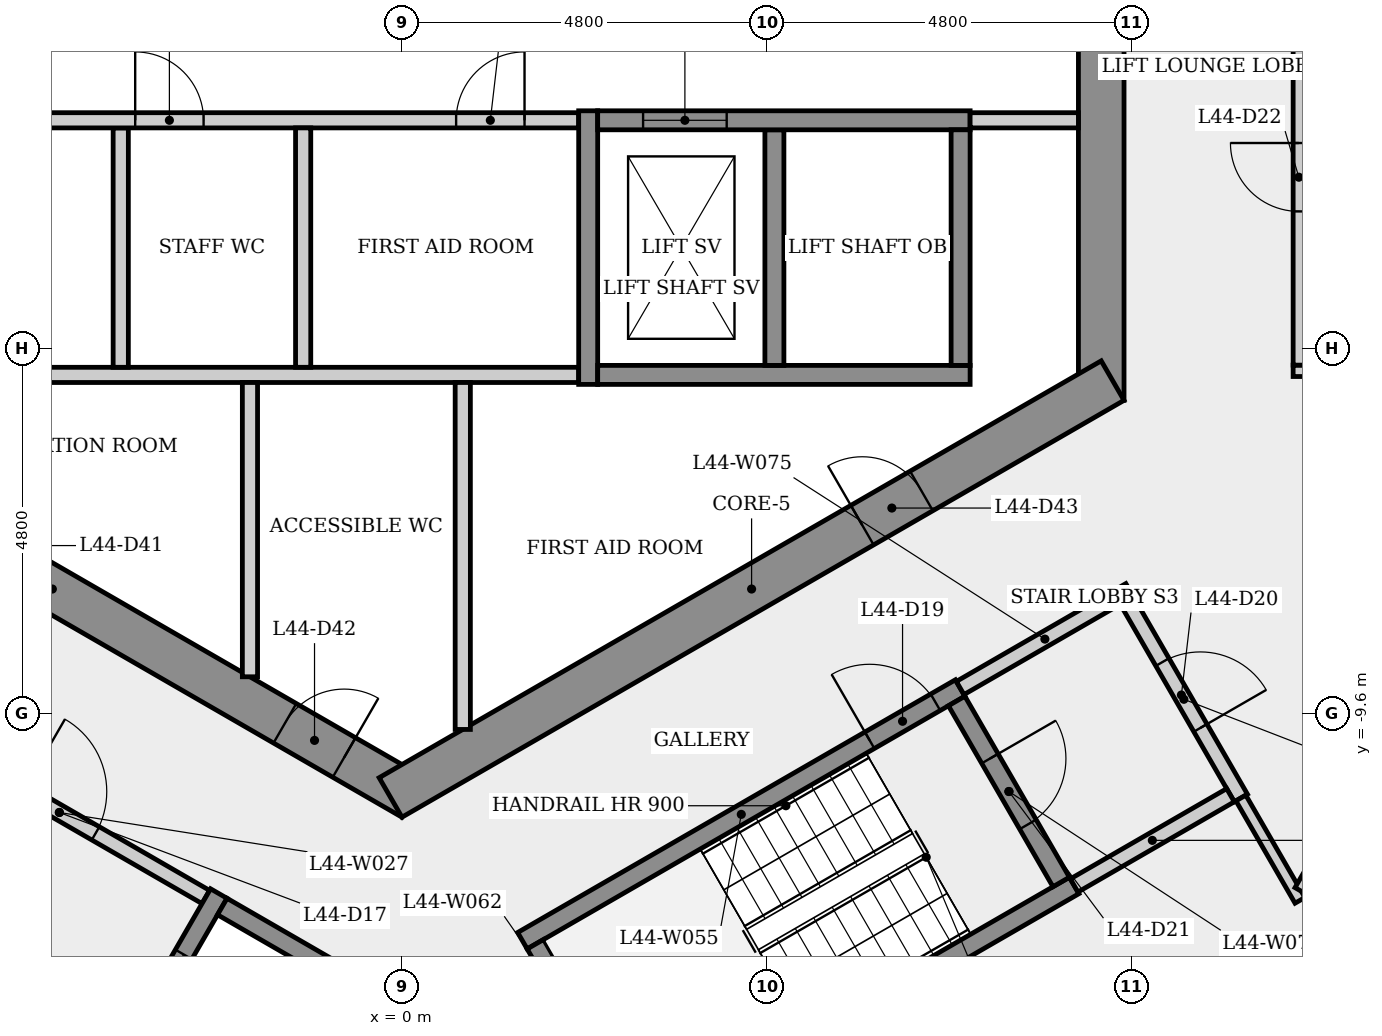
"""IFC4 building model, lengths in metres.
Left out: names, types, materials, properties, quantities, classifications, styles, units other than length and angle.
Written with IfcOpenShell. Run it as: python <this file> out.ifc"""

import sys

from ifc_helpers import new_model, si_unit, direction, frame, frame_2d, origin, place, context, subcontext, project, spatial, rectangle, extrude, element, fill, save


model = new_model("IFC4")
c1 = context("Model", 3, precision=1e-05, world=origin(), true_north=direction((0.0, 1.0)))
c2 = subcontext(c1, "Body", "Model", "MODEL_VIEW")
j1 = project(units=[si_unit("LENGTHUNIT", "METRE"), si_unit("PLANEANGLEUNIT", "RADIAN")], contexts=[c1])
p1 = place(None, origin())
s1 = spatial("IfcSite", under=j1, at=p1, CompositionType="ELEMENT")
p2 = place(p1, origin())
s2 = spatial("IfcBuilding", under=s1, at=p2, CompositionType="ELEMENT")
p3 = place(p2, frame((0.0, 0.0, 166.3)))
s3 = spatial("IfcBuildingStorey", under=s2, at=p3, CompositionType="ELEMENT", Elevation=166.3)
p4 = place(p3, frame((9.2, -5.485, 0.0), z_axis=(0.0, 0.0, 1.0), x_axis=(0.0, 1.0, 0.0)))
e1 = element("IfcWall", 1, at=p4, inside=s3, PredefinedType="SHEAR", context=c2, shape_type="SweptSolid", body=[
    extrude(rectangle(XDim=10.97, YDim=0.6, at=frame_2d((5.485, 0.0))), origin(), (0.0, 0.0, 1.0), 3.4),
])
p5 = place(p4, frame((4.685, 0.0, 0.0)))
e2 = element("IfcOpeningElement", 2, at=p5, cuts=e1, PredefinedType="OPENING", context=c2, shape_type="SweptSolid", body=[
    extrude(rectangle(XDim=1.6, YDim=2.1, at=frame_2d((0.8, 1.05))), frame((0.0, 0.31, 0.0), z_axis=(0.0, -1.0, 0.0), x_axis=(1.0, 0.0, 0.0)), (0.0, 0.0, 1.0), 0.62),
])
p6 = place(p3, frame((-9.35, -5.225, 0.0), z_axis=(0.0, 0.0, 1.0), x_axis=(0.866023993627, -0.500002442456, 0.0)))
e3 = element("IfcWall", 3, at=p6, inside=s3, PredefinedType="SHEAR", context=c2, shape_type="SweptSolid", body=[
    extrude(rectangle(XDim=10.97, YDim=0.6, at=frame_2d((5.485, 0.0))), origin(), (0.0, 0.0, 1.0), 3.4),
])
p7 = place(p6, frame((3.891, 0.0, 0.0)))
e4 = element("IfcOpeningElement", 4, at=p7, cuts=e3, PredefinedType="OPENING", context=c2, shape_type="SweptSolid", body=[
    extrude(rectangle(XDim=0.9, YDim=2.1, at=frame_2d((0.45, 1.05))), frame((0.0, 0.31, 0.0), z_axis=(0.0, -1.0, 0.0), x_axis=(1.0, 0.0, 0.0)), (0.0, 0.0, 1.0), 0.62),
])
p8 = place(p6, frame((9.018, 0.0, 0.0)))
e5 = element("IfcOpeningElement", 5, at=p8, cuts=e3, PredefinedType="OPENING", context=c2, shape_type="SweptSolid", body=[
    extrude(rectangle(XDim=0.9, YDim=2.1, at=frame_2d((0.45, 1.05))), frame((0.0, 0.31, 0.0), z_axis=(0.0, -1.0, 0.0), x_axis=(1.0, 0.0, 0.0)), (0.0, 0.0, 1.0), 0.62),
])
p9 = place(p3, frame((-0.15, -10.71, 0.0), z_axis=(0.0, 0.0, 1.0), x_axis=(0.866023993627, 0.500002442456, 0.0)))
e6 = element("IfcWall", 6, at=p9, inside=s3, PredefinedType="SHEAR", context=c2, shape_type="SweptSolid", body=[
    extrude(rectangle(XDim=10.97, YDim=0.6, at=frame_2d((5.485, 0.0))), origin(), (0.0, 0.0, 1.0), 3.4),
])
p10 = place(p9, frame((7.166, 0.0, 0.0)))
e7 = element("IfcOpeningElement", 7, at=p10, cuts=e6, PredefinedType="OPENING", context=c2, shape_type="SweptSolid", body=[
    extrude(rectangle(XDim=0.9, YDim=2.1, at=frame_2d((0.45, 1.05))), frame((0.0, 0.31, 0.0), z_axis=(0.0, -1.0, 0.0), x_axis=(1.0, 0.0, 0.0)), (0.0, 0.0, 1.0), 0.62),
])
p11 = place(p3, frame((-8.88, -5.15, 0.0), z_axis=(0.0, 0.0, 1.0), x_axis=(1.0, 0.0, 0.0)))
e8 = element("IfcWall", 8, at=p11, inside=s3, PredefinedType="PARTITIONING", context=c2, shape_type="SweptSolid", body=[
    extrude(rectangle(XDim=11.205, YDim=0.2, at=frame_2d((5.603, 0.0))), origin(), (0.0, 0.0, 1.0), 3.05),
])
p12 = place(p3, frame((-6.435, -9.795, 0.0), z_axis=(0.0, 0.0, 1.0), x_axis=(0.866012907634, -0.500021643343, 0.0)))
e9 = element("IfcWall", 9, at=p12, inside=s3, PredefinedType="PARTITIONING", context=c2, shape_type="SweptSolid", body=[
    extrude(rectangle(XDim=4.45, YDim=0.2, at=frame_2d((2.225, 0.0))), origin(), (0.0, 0.0, 1.0), 3.05),
])
p13 = place(p12, frame((1.675, 0.0, 0.0)))
e10 = element("IfcOpeningElement", 10, at=p13, cuts=e9, PredefinedType="OPENING", context=c2, shape_type="SweptSolid", body=[
    extrude(rectangle(XDim=1.1, YDim=2.1, at=frame_2d((0.55, 1.05))), frame((0.0, 0.11, 0.0), z_axis=(0.0, -1.0, 0.0), x_axis=(1.0, 0.0, 0.0)), (0.0, 0.0, 1.0), 0.22),
])
p14 = place(p3, frame((-3.7, -1.9, 0.0), z_axis=(0.0, 0.0, 1.0), x_axis=(0.0, -1.0, 0.0)))
e11 = element("IfcWall", 11, at=p14, inside=s3, PredefinedType="PARTITIONING", context=c2, shape_type="SweptSolid", body=[
    extrude(rectangle(XDim=3.15, YDim=0.2, at=frame_2d((1.575, 0.0))), origin(), (0.0, 0.0, 1.0), 3.05),
])
p15 = place(p3, frame((-8.9, -1.8, 0.0), z_axis=(0.0, 0.0, 1.0), x_axis=(1.0, 0.0, 0.0)))
e12 = element("IfcWall", 12, at=p15, inside=s3, PredefinedType="PARTITIONING", context=c2, shape_type="SweptSolid", body=[
    extrude(rectangle(XDim=11.225, YDim=0.2, at=frame_2d((5.613, 0.0))), origin(), (0.0, 0.0, 1.0), 3.05),
])
p16 = place(p15, frame((2.135, 0.0, 0.0)))
e13 = element("IfcOpeningElement", 13, at=p16, cuts=e12, PredefinedType="OPENING", context=c2, shape_type="SweptSolid", body=[
    extrude(rectangle(XDim=0.9, YDim=2.1, at=frame_2d((0.45, 1.05))), frame((0.0, 0.11, 0.0), z_axis=(0.0, -1.0, 0.0), x_axis=(1.0, 0.0, 0.0)), (0.0, 0.0, 1.0), 0.22),
])
p17 = place(p15, frame((5.39, 0.0, 0.0)))
e14 = element("IfcOpeningElement", 14, at=p17, cuts=e12, PredefinedType="OPENING", context=c2, shape_type="SweptSolid", body=[
    extrude(rectangle(XDim=0.9, YDim=2.1, at=frame_2d((0.45, 1.05))), frame((0.0, 0.11, 0.0), z_axis=(0.0, -1.0, 0.0), x_axis=(1.0, 0.0, 0.0)), (0.0, 0.0, 1.0), 0.22),
])
p18 = place(p15, frame((9.613, 0.0, 0.0)))
e15 = element("IfcOpeningElement", 15, at=p18, cuts=e12, PredefinedType="OPENING", context=c2, shape_type="SweptSolid", body=[
    extrude(rectangle(XDim=0.9, YDim=2.1, at=frame_2d((0.45, 1.05))), frame((0.0, 0.11, 0.0), z_axis=(0.0, -1.0, 0.0), x_axis=(1.0, 0.0, 0.0)), (0.0, 0.0, 1.0), 0.22),
])
p19 = place(p3, frame((-2.41, -11.974, 0.0), z_axis=(0.0, 0.0, 1.0), x_axis=(-0.500001826776, -0.866024349092, 0.0)))
e16 = element("IfcWall", 16, at=p19, inside=s3, PredefinedType="SHEAR", context=c2, shape_type="SweptSolid", body=[
    extrude(rectangle(XDim=2.95, YDim=0.25, at=frame_2d((1.475, 0.0))), origin(), (0.0, 0.0, 1.0), 3.05),
])
p20 = place(p19, frame((0.925, 0.0, 0.0)))
e17 = element("IfcOpeningElement", 17, at=p20, cuts=e16, PredefinedType="OPENING", context=c2, shape_type="SweptSolid", body=[
    extrude(rectangle(XDim=1.1, YDim=2.1, at=frame_2d((0.55, 1.05))), frame((0.0, 0.135, 0.0), z_axis=(0.0, -1.0, 0.0), x_axis=(1.0, 0.0, 0.0)), (0.0, 0.0, 1.0), 0.27),
])
p21 = place(p3, frame((-2.364, -12.145, 0.0), z_axis=(0.0, 0.0, 1.0), x_axis=(0.866040211805, -0.499974350878, 0.0)))
e18 = element("IfcWall", 18, at=p21, inside=s3, PredefinedType="SHEAR", context=c2, shape_type="SweptSolid", body=[
    extrude(rectangle(XDim=3.3, YDim=0.25, at=frame_2d((1.65, 0.0))), origin(), (0.0, 0.0, 1.0), 3.05),
])
p22 = place(p3, frame((-2.0, -5.25, 0.0), z_axis=(0.0, 0.0, 1.0), x_axis=(0.0, -1.0, 0.0)))
e19 = element("IfcWall", 19, at=p22, inside=s3, PredefinedType="PARTITIONING", context=c2, shape_type="SweptSolid", body=[
    extrude(rectangle(XDim=3.872, YDim=0.2, at=frame_2d((1.936, 0.0))), origin(), (0.0, 0.0, 1.0), 3.05),
])
p23 = place(p3, frame((-1.3, -1.9, 0.0), z_axis=(0.0, 0.0, 1.0), x_axis=(0.0, -1.0, 0.0)))
e20 = element("IfcWall", 20, at=p23, inside=s3, PredefinedType="PARTITIONING", context=c2, shape_type="SweptSolid", body=[
    extrude(rectangle(XDim=3.15, YDim=0.2, at=frame_2d((1.575, 0.0))), origin(), (0.0, 0.0, 1.0), 3.05),
])
p24 = place(p3, frame((0.8, -5.25, 0.0), z_axis=(0.0, 0.0, 1.0), x_axis=(0.0, -1.0, 0.0)))
e21 = element("IfcWall", 21, at=p24, inside=s3, PredefinedType="PARTITIONING", context=c2, shape_type="SweptSolid", body=[
    extrude(rectangle(XDim=4.565, YDim=0.2, at=frame_2d((2.282, 0.0))), origin(), (0.0, 0.0, 1.0), 3.05),
])
p25 = place(p3, frame((1.585, -12.595, 0.0), z_axis=(0.0, 0.0, 1.0), x_axis=(0.866036417653, 0.499980922934, 0.0)))
e22 = element("IfcWall", 22, at=p25, inside=s3, PredefinedType="SHEAR", context=c2, shape_type="SweptSolid", body=[
    extrude(rectangle(XDim=6.65, YDim=0.25, at=frame_2d((3.325, 0.0))), origin(), (0.0, 0.0, 1.0), 3.05),
])
p26 = place(p25, frame((5.275, 0.0, 0.0)))
e23 = element("IfcOpeningElement", 23, at=p26, cuts=e22, PredefinedType="OPENING", context=c2, shape_type="SweptSolid", body=[
    extrude(rectangle(XDim=1.0, YDim=2.1, at=frame_2d((0.5, 1.05))), frame((0.0, 0.135, 0.0), z_axis=(0.0, -1.0, 0.0), x_axis=(1.0, 0.0, 0.0)), (0.0, 0.0, 1.0), 0.27),
])
p27 = place(p3, frame((2.45, -5.275, 0.0), z_axis=(0.0, 0.0, 1.0), x_axis=(0.0, 1.0, 0.0)))
e24 = element("IfcWall", 24, at=p27, inside=s3, PredefinedType="SHEAR", context=c2, shape_type="SweptSolid", body=[
    extrude(rectangle(XDim=3.6, YDim=0.25, at=frame_2d((1.8, 0.0))), origin(), (0.0, 0.0, 1.0), 3.05),
])
p28 = place(p3, frame((3.256, -15.239, 0.0), z_axis=(0.0, 0.0, 1.0), x_axis=(-0.50002537861, 0.866010750942, 0.0)))
e25 = element("IfcWall", 25, at=p28, inside=s3, PredefinedType="SHEAR", context=c2, shape_type="SweptSolid", body=[
    extrude(rectangle(XDim=3.0, YDim=0.25, at=frame_2d((1.5, 0.0))), origin(), (0.0, 0.0, 1.0), 3.05),
])
p29 = place(p3, frame((2.575, -5.15, 0.0), z_axis=(0.0, 0.0, 1.0), x_axis=(1.0, 0.0, 0.0)))
e26 = element("IfcWall", 26, at=p29, inside=s3, PredefinedType="SHEAR", context=c2, shape_type="SweptSolid", body=[
    extrude(rectangle(XDim=4.9, YDim=0.25, at=frame_2d((2.45, 0.0))), origin(), (0.0, 0.0, 1.0), 3.05),
])
p30 = place(p3, frame((4.9, -1.925, 0.0), z_axis=(0.0, 0.0, 1.0), x_axis=(0.0, -1.0, 0.0)))
e27 = element("IfcWall", 27, at=p30, inside=s3, PredefinedType="SHEAR", context=c2, shape_type="SweptSolid", body=[
    extrude(rectangle(XDim=3.1, YDim=0.25, at=frame_2d((1.55, 0.0))), origin(), (0.0, 0.0, 1.0), 3.4),
])
p31 = place(p3, frame((2.575, -1.8, 0.0), z_axis=(0.0, 0.0, 1.0), x_axis=(1.0, 0.0, 0.0)))
e28 = element("IfcWall", 28, at=p31, inside=s3, PredefinedType="SHEAR", context=c2, shape_type="SweptSolid", body=[
    extrude(rectangle(XDim=4.9, YDim=0.25, at=frame_2d((2.45, 0.0))), origin(), (0.0, 0.0, 1.0), 3.05),
])
p32 = place(p31, frame((0.597, 0.0, 0.0)))
e29 = element("IfcOpeningElement", 29, at=p32, cuts=e28, PredefinedType="OPENING", context=c2, shape_type="SweptSolid", body=[
    extrude(rectangle(XDim=1.1, YDim=2.1, at=frame_2d((0.55, 1.05))), frame((0.0, 0.135, 0.0), z_axis=(0.0, -1.0, 0.0), x_axis=(1.0, 0.0, 0.0)), (0.0, 0.0, 1.0), 0.27),
])
p33 = place(p3, frame((3.301, -15.068, 0.0), z_axis=(0.0, 0.0, 1.0), x_axis=(0.866035036182, 0.499983315828, 0.0)))
e30 = element("IfcWall", 30, at=p33, inside=s3, PredefinedType="SHEAR", context=c2, shape_type="SweptSolid", body=[
    extrude(rectangle(XDim=6.4, YDim=0.25, at=frame_2d((3.2, 0.0))), origin(), (0.0, 0.0, 1.0), 3.05),
])
p34 = place(p3, frame((7.298, -9.441, 0.0), z_axis=(0.0, 0.0, 1.0), x_axis=(0.500034990121, -0.866005201286, 0.0)))
e31 = element("IfcWall", 31, at=p34, inside=s3, PredefinedType="SHEAR", context=c2, shape_type="SweptSolid", body=[
    extrude(rectangle(XDim=2.75, YDim=0.25, at=frame_2d((1.375, 0.0))), origin(), (0.0, 0.0, 1.0), 3.05),
])
p35 = place(p34, frame((0.875, 0.0, 0.0)))
e32 = element("IfcOpeningElement", 32, at=p35, cuts=e31, PredefinedType="OPENING", context=c2, shape_type="SweptSolid", body=[
    extrude(rectangle(XDim=1.0, YDim=2.1, at=frame_2d((0.5, 1.05))), frame((0.0, 0.135, 0.0), z_axis=(0.0, -1.0, 0.0), x_axis=(1.0, 0.0, 0.0)), (0.0, 0.0, 1.0), 0.27),
])
p36 = place(p3, frame((7.344, -9.27, 0.0), z_axis=(0.0, 0.0, 1.0), x_axis=(0.866005588531, 0.500034319456, 0.0)))
e33 = element("IfcWall", 33, at=p36, inside=s3, PredefinedType="PARTITIONING", context=c2, shape_type="SweptSolid", body=[
    extrude(rectangle(XDim=2.575, YDim=0.2, at=frame_2d((1.288, 0.0))), origin(), (0.0, 0.0, 1.0), 3.05),
])
p37 = place(p3, frame((7.35, -1.925, 0.0), z_axis=(0.0, 0.0, 1.0), x_axis=(0.0, -1.0, 0.0)))
e34 = element("IfcWall", 34, at=p37, inside=s3, PredefinedType="SHEAR", context=c2, shape_type="SweptSolid", body=[
    extrude(rectangle(XDim=3.1, YDim=0.25, at=frame_2d((1.55, 0.0))), origin(), (0.0, 0.0, 1.0), 3.4),
])
p38 = place(p3, frame((8.9, -1.8, 0.0), z_axis=(0.0, 0.0, 1.0), x_axis=(-1.0, 0.0, 0.0)))
e35 = element("IfcWall", 35, at=p38, inside=s3, PredefinedType="PARTITIONING", context=c2, shape_type="SweptSolid", body=[
    extrude(rectangle(XDim=1.425, YDim=0.2, at=frame_2d((0.712, 0.0))), origin(), (0.0, 0.0, 1.0), 3.05),
])
p39 = place(p3, frame((9.537, -8.119, 0.0), z_axis=(0.0, 0.0, 1.0), x_axis=(0.499990139034, -0.866031096941, 0.0)))
e36 = element("IfcWall", 36, at=p39, inside=s3, PredefinedType="PARTITIONING", context=c2, shape_type="SweptSolid", body=[
    extrude(rectangle(XDim=3.0, YDim=0.2, at=frame_2d((1.5, 0.0))), origin(), (0.0, 0.0, 1.0), 3.05),
])
p40 = place(p39, frame((0.935, 0.0, 0.0)))
e37 = element("IfcOpeningElement", 37, at=p40, cuts=e36, PredefinedType="OPENING", context=c2, shape_type="SweptSolid", body=[
    extrude(rectangle(XDim=1.0, YDim=2.1, at=frame_2d((0.5, 1.05))), frame((0.0, 0.11, 0.0), z_axis=(0.0, -1.0, 0.0), x_axis=(1.0, 0.0, 0.0)), (0.0, 0.0, 1.0), 0.22),
])
p41 = place(p3, frame((10.901, -10.681, 0.0), z_axis=(0.0, 0.0, 1.0), x_axis=(-0.866007538022, -0.500030943131, 0.0)))
e38 = element("IfcWall", 38, at=p41, inside=s3, PredefinedType="PARTITIONING", context=c2, shape_type="SweptSolid", body=[
    extrude(rectangle(XDim=2.375, YDim=0.2, at=frame_2d((1.188, 0.0))), origin(), (0.0, 0.0, 1.0), 3.05),
])
p42 = place(p3, frame((11.815, -12.064, 0.0), z_axis=(0.0, 0.0, 1.0), x_axis=(-0.499921796684, 0.866070549782, 0.0)))
e39 = element("IfcWall", 39, at=p42, inside=s3, PredefinedType="PARTITIONING", context=c2, shape_type="SweptSolid", body=[
    extrude(rectangle(XDim=1.555, YDim=0.15, at=frame_2d((0.777, 0.0))), origin(), (0.0, 0.0, 1.0), 3.05),
])
p43 = place(p3, frame((11.725, -5.096, 0.0), z_axis=(0.0, 0.0, 1.0), x_axis=(1.0, 0.0, 0.0)))
e40 = element("IfcWall", 40, at=p43, inside=s3, PredefinedType="PARTITIONING", context=c2, shape_type="SweptSolid", body=[
    extrude(rectangle(XDim=4.113, YDim=0.15, at=frame_2d((2.056, 0.0))), origin(), (0.0, 0.0, 1.0), 3.05),
])
p44 = place(p3, frame((11.8, -5.021, 0.0), z_axis=(0.0, 0.0, 1.0), x_axis=(0.0, 1.0, 0.0)))
e41 = element("IfcWall", 41, at=p44, inside=s3, PredefinedType="PARTITIONING", context=c2, shape_type="SweptSolid", body=[
    extrude(rectangle(XDim=10.193, YDim=0.15, at=frame_2d((5.096, 0.0))), origin(), (0.0, 0.0, 1.0), 3.05),
])
p45 = place(p44, frame((2.022, 0.0, 0.0)))
e42 = element("IfcOpeningElement", 42, at=p45, cuts=e41, PredefinedType="OPENING", context=c2, shape_type="SweptSolid", body=[
    extrude(rectangle(XDim=0.9, YDim=2.1, at=frame_2d((0.45, 1.05))), frame((0.0, 0.085, 0.0), z_axis=(0.0, -1.0, 0.0), x_axis=(1.0, 0.0, 0.0)), (0.0, 0.0, 1.0), 0.17),
])
p46 = place(p44, frame((6.22, 0.0, 0.0)))
e43 = element("IfcOpeningElement", 43, at=p46, cuts=e41, PredefinedType="OPENING", context=c2, shape_type="SweptSolid", body=[
    extrude(rectangle(XDim=1.0, YDim=2.1, at=frame_2d((0.5, 1.05))), frame((0.0, 0.085, 0.0), z_axis=(0.0, -1.0, 0.0), x_axis=(1.0, 0.0, 0.0)), (0.0, 0.0, 1.0), 0.17),
])
p47 = place(p3, frame((15.725, -5.161, 0.0), z_axis=(0.0, 0.0, 1.0), x_axis=(-0.500030520673, -0.866007781949, 0.0)))
e44 = element("IfcWall", 44, at=p47, inside=s3, PredefinedType="PARTITIONING", context=c2, shape_type="SweptSolid", body=[
    extrude(rectangle(XDim=7.82, YDim=0.15, at=frame_2d((3.91, 0.0))), origin(), (0.0, 0.0, 1.0), 3.05),
])
p48 = place(p47, frame((3.41, 0.0, 0.0)))
e45 = element("IfcOpeningElement", 45, at=p48, cuts=e44, PredefinedType="OPENING", context=c2, shape_type="SweptSolid", body=[
    extrude(rectangle(XDim=1.0, YDim=2.1, at=frame_2d((0.5, 1.05))), frame((0.0, 0.085, 0.0), z_axis=(0.0, -1.0, 0.0), x_axis=(1.0, 0.0, 0.0)), (0.0, 0.0, 1.0), 0.17),
])
p49 = place(p32, origin())
e46 = element("IfcDoor", 46, at=p49, inside=s3, OperationType="SLIDING_TO_LEFT", PredefinedType="DOOR", context=c2, shape_type="SweptSolid", body=[
    extrude(rectangle(XDim=1.1, YDim=2.1, at=frame_2d((0.55, 1.05))), frame((0.0, 0.025, 0.0), z_axis=(0.0, -1.0, 0.0), x_axis=(1.0, 0.0, 0.0)), (0.0, 0.0, 1.0), 0.05),
])
fill(e29, e46)
p50 = place(p17, origin())
e47 = element("IfcDoor", 47, at=p50, inside=s3, OperationType="SINGLE_SWING_LEFT", PredefinedType="DOOR", context=c2, shape_type="SweptSolid", body=[
    extrude(rectangle(XDim=0.9, YDim=2.1, at=frame_2d((0.45, 1.05))), frame((0.0, 0.025, 0.0), z_axis=(0.0, -1.0, 0.0), x_axis=(1.0, 0.0, 0.0)), (0.0, 0.0, 1.0), 0.05),
])
fill(e14, e47)
p51 = place(p18, origin())
e48 = element("IfcDoor", 48, at=p51, inside=s3, OperationType="SINGLE_SWING_RIGHT", PredefinedType="DOOR", context=c2, shape_type="SweptSolid", body=[
    extrude(rectangle(XDim=0.9, YDim=2.1, at=frame_2d((0.45, 1.05))), frame((0.0, 0.025, 0.0), z_axis=(0.0, -1.0, 0.0), x_axis=(1.0, 0.0, 0.0)), (0.0, 0.0, 1.0), 0.05),
])
fill(e15, e48)
p52 = place(p13, origin())
e49 = element("IfcDoor", 49, at=p52, inside=s3, OperationType="SINGLE_SWING_LEFT", PredefinedType="DOOR", context=c2, shape_type="SweptSolid", body=[
    extrude(rectangle(XDim=1.1, YDim=2.1, at=frame_2d((0.55, 1.05))), frame((0.0, 0.025, 0.0), z_axis=(0.0, -1.0, 0.0), x_axis=(1.0, 0.0, 0.0)), (0.0, 0.0, 1.0), 0.05),
])
fill(e10, e49)
p53 = place(p20, origin())
e50 = element("IfcDoor", 50, at=p53, inside=s3, OperationType="SLIDING_TO_LEFT", PredefinedType="DOOR", context=c2, shape_type="SweptSolid", body=[
    extrude(rectangle(XDim=1.1, YDim=2.1, at=frame_2d((0.55, 1.05))), frame((0.0, 0.025, 0.0), z_axis=(0.0, -1.0, 0.0), x_axis=(1.0, 0.0, 0.0)), (0.0, 0.0, 1.0), 0.05),
])
fill(e17, e50)
p54 = place(p26, origin())
e51 = element("IfcDoor", 51, at=p54, inside=s3, OperationType="SINGLE_SWING_LEFT", PredefinedType="DOOR", context=c2, shape_type="SweptSolid", body=[
    extrude(rectangle(XDim=1.0, YDim=2.1, at=frame_2d((0.5, 1.05))), frame((0.0, 0.025, 0.0), z_axis=(0.0, -1.0, 0.0), x_axis=(1.0, 0.0, 0.0)), (0.0, 0.0, 1.0), 0.05),
])
fill(e23, e51)
p55 = place(p40, origin())
e52 = element("IfcDoor", 52, at=p55, inside=s3, OperationType="SINGLE_SWING_RIGHT", PredefinedType="DOOR", context=c2, shape_type="SweptSolid", body=[
    extrude(rectangle(XDim=1.0, YDim=2.1, at=frame_2d((0.5, 1.05))), frame((0.0, 0.025, 0.0), z_axis=(0.0, -1.0, 0.0), x_axis=(1.0, 0.0, 0.0)), (0.0, 0.0, 1.0), 0.05),
])
fill(e37, e52)
p56 = place(p35, origin())
e53 = element("IfcDoor", 53, at=p56, inside=s3, OperationType="SINGLE_SWING_LEFT", PredefinedType="DOOR", context=c2, shape_type="SweptSolid", body=[
    extrude(rectangle(XDim=1.0, YDim=2.1, at=frame_2d((0.5, 1.05))), frame((0.0, 0.025, 0.0), z_axis=(0.0, -1.0, 0.0), x_axis=(1.0, 0.0, 0.0)), (0.0, 0.0, 1.0), 0.05),
])
fill(e32, e53)
p57 = place(p45, origin())
e54 = element("IfcDoor", 54, at=p57, inside=s3, OperationType="SINGLE_SWING_RIGHT", PredefinedType="DOOR", context=c2, shape_type="SweptSolid", body=[
    extrude(rectangle(XDim=0.9, YDim=2.1, at=frame_2d((0.45, 1.05))), frame((0.0, 0.025, 0.0), z_axis=(0.0, -1.0, 0.0), x_axis=(1.0, 0.0, 0.0)), (0.0, 0.0, 1.0), 0.05),
])
fill(e42, e54)
p58 = place(p8, origin())
e55 = element("IfcDoor", 55, at=p58, inside=s3, OperationType="SINGLE_SWING_RIGHT", PredefinedType="DOOR", context=c2, shape_type="SweptSolid", body=[
    extrude(rectangle(XDim=0.9, YDim=2.1, at=frame_2d((0.45, 1.05))), frame((0.0, 0.025, 0.0), z_axis=(0.0, -1.0, 0.0), x_axis=(1.0, 0.0, 0.0)), (0.0, 0.0, 1.0), 0.05),
])
fill(e5, e55)
p59 = place(p10, origin())
e56 = element("IfcDoor", 56, at=p59, inside=s3, OperationType="SINGLE_SWING_LEFT", PredefinedType="DOOR", context=c2, shape_type="SweptSolid", body=[
    extrude(rectangle(XDim=0.9, YDim=2.1, at=frame_2d((0.45, 1.05))), frame((0.0, 0.025, 0.0), z_axis=(0.0, -1.0, 0.0), x_axis=(1.0, 0.0, 0.0)), (0.0, 0.0, 1.0), 0.05),
])
fill(e7, e56)
save(model, sys.argv[1])
